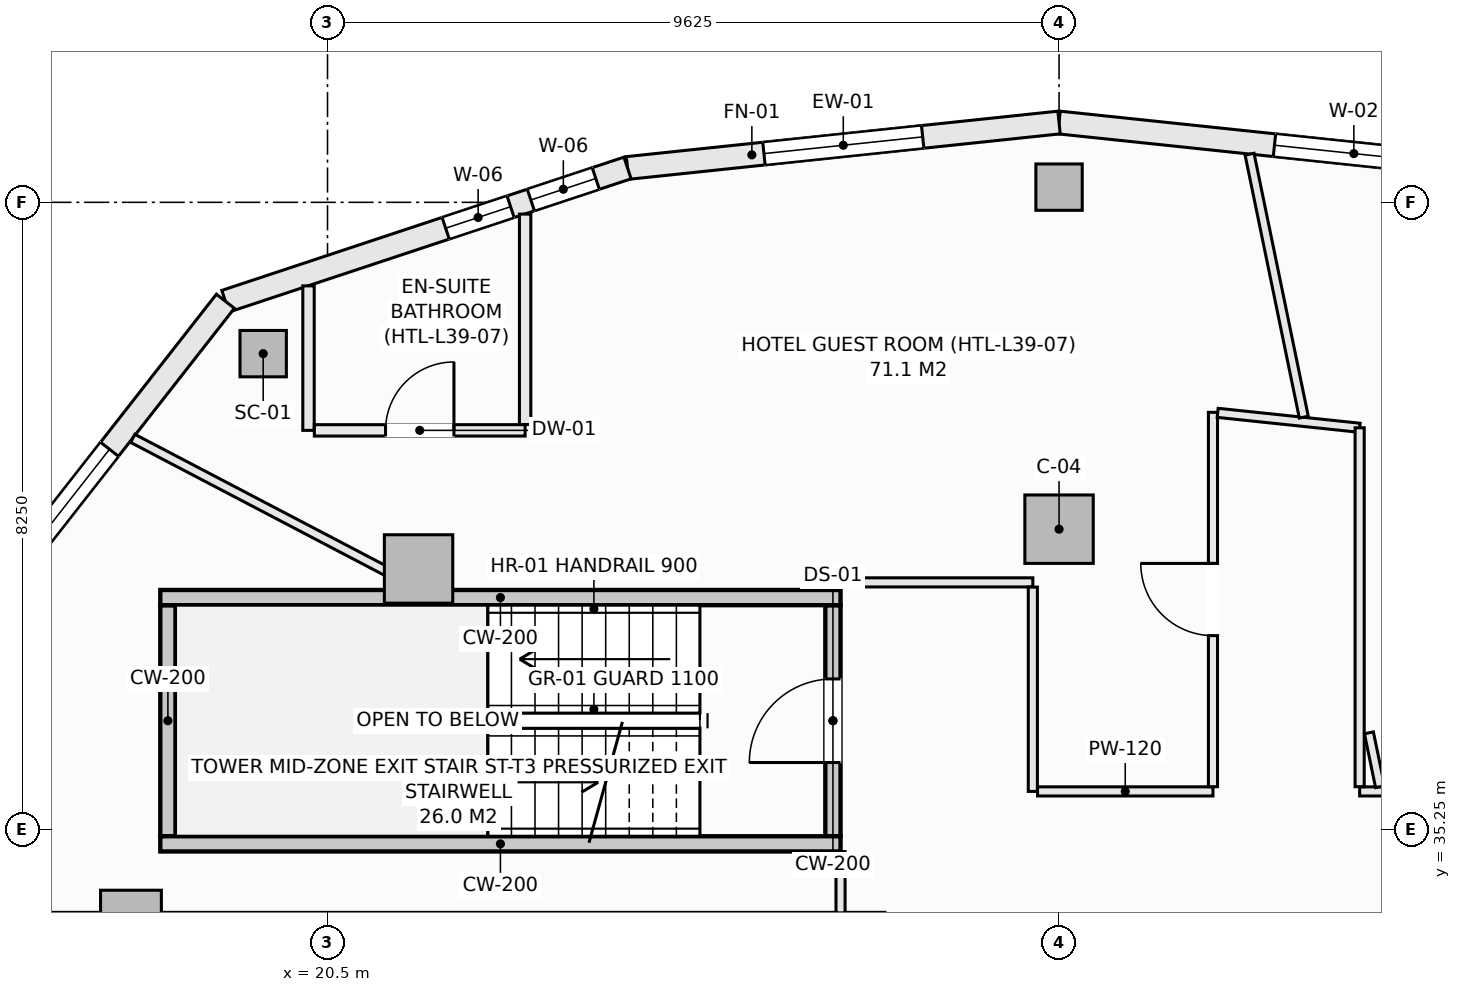
"""IFC4 building model, lengths in metres.
Left out: names, types, materials, properties, quantities, classifications, styles, units other than length and angle.
Written with IfcOpenShell. Run it as: python <this file> out.ifc"""

import sys

from ifc_helpers import new_model, si_unit, direction, frame, frame_2d, origin, origin_2d, place, context, subcontext, project, spatial, rectangle, hollow_rectangle, extrude, element, fill, save


model = new_model("IFC4")
c1 = context("Model", 3, precision=1e-05, world=origin(), true_north=direction((0.0, 1.0)))
c2 = subcontext(c1, "Body", "Model", "MODEL_VIEW")
j1 = project(units=[si_unit("LENGTHUNIT", "METRE"), si_unit("PLANEANGLEUNIT", "RADIAN")], contexts=[c1])
p1 = place(None, origin())
s1 = spatial("IfcSite", under=j1, at=p1, CompositionType="ELEMENT")
p2 = place(p1, origin())
s2 = spatial("IfcBuilding", under=s1, at=p2, CompositionType="ELEMENT")
p3 = place(p2, frame((0.0, 0.0, 152.9)))
s3 = spatial("IfcBuildingStorey", under=s2, at=p3, CompositionType="ELEMENT", Elevation=152.9)
for number, where, z_axis, x_axis in (
    (1, (30.125, 43.7, -0.27), (0.0, 0.0, 1.0), (1.0, 0.0, 0.0)),
    (2, (19.654, 41.51, -0.27), (0.0, 0.0, 1.0), (1.0, 0.0, 0.0)),
):
    element("IfcColumn", number, at=place(p3, frame(where, z_axis=z_axis, x_axis=x_axis)), inside=s3, PredefinedType="COLUMN", context=c2, shape_type="SweptSolid", body=[
        extrude(hollow_rectangle(XDim=0.61, YDim=0.61, WallThickness=0.025, at=origin_2d()), origin(), (0.0, 0.0, 1.0), 3.4),
    ])
for number, where, z_axis, x_axis in (
    (3, (30.125, 39.2, -0.27), (0.0, 0.0, 1.0), (1.0, 0.0, 0.0)),
    (4, (21.698, 38.677, -0.27), (0.0, 0.0, 1.0), (1.0, 0.0, 0.0)),
):
    element("IfcColumn", number, at=place(p3, frame(where, z_axis=z_axis, x_axis=x_axis)), inside=s3, PredefinedType="COLUMN", context=c2, shape_type="SweptSolid", body=[
        extrude(rectangle(XDim=0.9, YDim=0.9, at=origin_2d()), origin(), (0.0, 0.0, 1.0), 3.4),
    ])
p4 = place(p3, frame((17.914, 34.05, -0.27), z_axis=(0.0, 0.0, 1.0), x_axis=(1.0, 0.0, 0.0)))
e5 = element("IfcColumn", 5, at=p4, inside=s3, PredefinedType="PILASTER", context=c2, shape_type="SweptSolid", body=[
    extrude(rectangle(XDim=0.8, YDim=0.8, at=origin_2d()), origin(), (0.0, 0.0, 1.0), 3.4),
])
p5 = place(p3, frame((30.125, 44.55, 0.0), z_axis=(0.0, 0.0, 1.0), x_axis=(0.994496545245, -0.104769372887, 0.0)))
e6 = element("IfcWall", 6, at=p5, inside=s3, PredefinedType="SOLIDWALL", context=c2, shape_type="SweptSolid", body=[
    extrude(rectangle(XDim=5.709, YDim=0.3, at=frame_2d((2.854, 0.0))), origin(), (0.0, 0.0, 1.0), 2.653),
])
p6 = place(p5, frame((2.85, 0.0, 0.74)))
e7 = element("IfcOpeningElement", 7, at=p6, cuts=e6, PredefinedType="OPENING", context=c2, shape_type="SweptSolid", body=[
    extrude(rectangle(XDim=2.1, YDim=1.7, at=frame_2d((1.05, 0.85))), frame((0.0, 0.16, 0.0), z_axis=(0.0, -1.0, 0.0), x_axis=(1.0, 0.0, 0.0)), (0.0, 0.0, 1.0), 0.32),
])
p7 = place(p3, frame((24.447, 43.952, 0.0), z_axis=(0.0, 0.0, 1.0), x_axis=(0.994496545245, 0.104769372887, 0.0)))
e8 = element("IfcWall", 8, at=p7, inside=s3, PredefinedType="SOLIDWALL", context=c2, shape_type="SweptSolid", body=[
    extrude(rectangle(XDim=5.709, YDim=0.3, at=frame_2d((2.854, 0.0))), origin(), (0.0, 0.0, 1.0), 2.653),
])
p8 = place(p7, frame((1.805, 0.0, 0.74)))
e9 = element("IfcOpeningElement", 9, at=p8, cuts=e8, PredefinedType="OPENING", context=c2, shape_type="SweptSolid", body=[
    extrude(rectangle(XDim=2.1, YDim=1.7, at=frame_2d((1.05, 0.85))), frame((0.0, 0.16, 0.0), z_axis=(0.0, -1.0, 0.0), x_axis=(1.0, 0.0, 0.0)), (0.0, 0.0, 1.0), 0.32),
])
p9 = place(p3, frame((19.156, 42.199, 0.0), z_axis=(0.0, 0.0, 1.0), x_axis=(0.949246811547, 0.314532177636, 0.0)))
e10 = element("IfcWall", 10, at=p9, inside=s3, PredefinedType="SOLIDWALL", context=c2, shape_type="SweptSolid", body=[
    extrude(rectangle(XDim=5.574, YDim=0.3, at=frame_2d((2.787, 0.0))), origin(), (0.0, 0.0, 1.0), 2.653),
])
p10 = place(p9, frame((3.053, 0.0, 0.74)))
e11 = element("IfcOpeningElement", 11, at=p10, cuts=e10, PredefinedType="OPENING", context=c2, shape_type="SweptSolid", body=[
    extrude(rectangle(XDim=0.9, YDim=1.7, at=frame_2d((0.45, 0.85))), frame((0.0, 0.16, 0.0), z_axis=(0.0, -1.0, 0.0), x_axis=(1.0, 0.0, 0.0)), (0.0, 0.0, 1.0), 0.32),
])
p11 = place(p9, frame((4.234, 0.0, 0.74)))
e12 = element("IfcOpeningElement", 12, at=p11, cuts=e10, PredefinedType="OPENING", context=c2, shape_type="SweptSolid", body=[
    extrude(rectangle(XDim=0.9, YDim=1.7, at=frame_2d((0.45, 0.85))), frame((0.0, 0.16, 0.0), z_axis=(0.0, -1.0, 0.0), x_axis=(1.0, 0.0, 0.0)), (0.0, 0.0, 1.0), 0.32),
])
p12 = place(p3, frame((15.937, 38.086, 0.0), z_axis=(0.0, 0.0, 1.0), x_axis=(0.616429245738, 0.787410302828, 0.0)))
e13 = element("IfcWall", 13, at=p12, inside=s3, PredefinedType="SOLIDWALL", context=c2, shape_type="SweptSolid", body=[
    extrude(rectangle(XDim=5.223, YDim=0.3, at=frame_2d((2.612, 0.0))), origin(), (0.0, 0.0, 1.0), 2.653),
])
p13 = place(p12, frame((0.65, 0.0, 0.74)))
e14 = element("IfcOpeningElement", 14, at=p13, cuts=e13, PredefinedType="OPENING", context=c2, shape_type="SweptSolid", body=[
    extrude(rectangle(XDim=2.1, YDim=1.7, at=frame_2d((1.05, 0.85))), frame((0.0, 0.16, 0.0), z_axis=(0.0, -1.0, 0.0), x_axis=(1.0, 0.0, 0.0)), (0.0, 0.0, 1.0), 0.32),
])
p14 = place(p3, frame((27.15, 35.16, -0.27), z_axis=(0.0, 0.0, 1.0), x_axis=(0.0, 1.0, 0.0)))
e15 = element("IfcWall", 15, at=p14, inside=s3, PredefinedType="SHEAR", context=c2, shape_type="SweptSolid", body=[
    extrude(rectangle(XDim=3.04, YDim=0.2, at=frame_2d((1.52, 0.0))), origin(), (0.0, 0.0, 1.0), 3.4),
])
p15 = place(p14, frame((0.97, 0.0, 0.27)))
e16 = element("IfcOpeningElement", 16, at=p15, cuts=e15, PredefinedType="OPENING", context=c2, shape_type="SweptSolid", body=[
    extrude(rectangle(XDim=1.1, YDim=2.15, at=frame_2d((0.55, 1.075))), frame((0.0, 0.11, 0.0), z_axis=(0.0, -1.0, 0.0), x_axis=(1.0, 0.0, 0.0)), (0.0, 0.0, 1.0), 0.22),
])
p16 = place(p3, frame((18.4, 35.16, -0.27), z_axis=(0.0, 0.0, 1.0), x_axis=(0.0, 1.0, 0.0)))
e17 = element("IfcWall", 17, at=p16, inside=s3, PredefinedType="SHEAR", context=c2, shape_type="SweptSolid", body=[
    extrude(rectangle(XDim=3.04, YDim=0.2, at=frame_2d((1.52, 0.0))), origin(), (0.0, 0.0, 1.0), 3.4),
])
for number, where, z_axis, x_axis in (
    (18, (18.3, 38.3, -0.27), (0.0, 0.0, 1.0), (1.0, 0.0, 0.0)),
    (19, (18.3, 35.06, -0.27), (0.0, 0.0, 1.0), (1.0, 0.0, 0.0)),
):
    element("IfcWall", number, at=place(p3, frame(where, z_axis=z_axis, x_axis=x_axis)), inside=s3, PredefinedType="SHEAR", context=c2, shape_type="SweptSolid", body=[
        extrude(rectangle(XDim=8.95, YDim=0.2, at=frame_2d((4.475, 0.0))), origin(), (0.0, 0.0, 1.0), 3.4),
    ])
p17 = place(p3, frame((27.25, 34.152, 0.0), z_axis=(0.0, 0.0, 1.0), x_axis=(0.0, 1.0, 0.0)))
e20 = element("IfcWall", 20, at=p17, inside=s3, PredefinedType="PARTITIONING", context=c2, shape_type="SweptSolid", body=[
    extrude(rectangle(XDim=0.806, YDim=0.12, at=frame_2d((0.403, 0.0))), origin(), (0.0, 0.0, 1.0), 3.13),
])
p18 = place(p3, frame((27.25, 38.5, 0.0), z_axis=(0.0, 0.0, 1.0), x_axis=(1.0, 0.0, 0.0)))
e21 = element("IfcWall", 21, at=p18, inside=s3, PredefinedType="PARTITIONING", context=c2, shape_type="SweptSolid", body=[
    extrude(rectangle(XDim=2.53, YDim=0.12, at=frame_2d((1.265, 0.0))), origin(), (0.0, 0.0, 1.0), 3.13),
])
p19 = place(p3, frame((29.78, 35.75, 0.0), z_axis=(0.0, 0.0, 1.0), x_axis=(0.0, 1.0, 0.0)))
e22 = element("IfcWall", 22, at=p19, inside=s3, PredefinedType="PARTITIONING", context=c2, shape_type="SweptSolid", body=[
    extrude(rectangle(XDim=2.688, YDim=0.12, at=frame_2d((1.344, 0.0))), origin(), (0.0, 0.0, 1.0), 3.13),
])
p20 = place(p3, frame((29.842, 35.75, 0.0), z_axis=(0.0, 0.0, 1.0), x_axis=(1.0, 0.0, 0.0)))
e23 = element("IfcWall", 23, at=p20, inside=s3, PredefinedType="PARTITIONING", context=c2, shape_type="SweptSolid", body=[
    extrude(rectangle(XDim=2.308, YDim=0.12, at=frame_2d((1.154, 0.0))), origin(), (0.0, 0.0, 1.0), 3.13),
])
p21 = place(p3, frame((34.08, 35.75, 0.0), z_axis=(0.0, 0.0, 1.0), x_axis=(1.0, 0.0, 0.0)))
e24 = element("IfcWall", 24, at=p21, inside=s3, PredefinedType="PARTITIONING", context=c2, shape_type="SweptSolid", body=[
    extrude(rectangle(XDim=4.878, YDim=0.12, at=frame_2d((2.439, 0.0))), origin(), (0.0, 0.0, 1.0), 2.505),
])
p22 = place(p21, frame((1.544, 0.0, 0.0)))
e25 = element("IfcOpeningElement", 25, at=p22, cuts=e24, PredefinedType="OPENING", context=c2, shape_type="SweptSolid", body=[
    extrude(rectangle(XDim=0.95, YDim=2.1, at=frame_2d((0.475, 1.05))), frame((0.0, 0.07, 0.0), z_axis=(0.0, -1.0, 0.0), x_axis=(1.0, 0.0, 0.0)), (0.0, 0.0, 1.0), 0.14),
])
p23 = place(p3, frame((32.15, 35.812, 0.0), z_axis=(0.0, 0.0, 1.0), x_axis=(0.0, 1.0, 0.0)))
e26 = element("IfcWall", 26, at=p23, inside=s3, PredefinedType="PARTITIONING", context=c2, shape_type="SweptSolid", body=[
    extrude(rectangle(XDim=4.925, YDim=0.12, at=frame_2d((2.462, 0.0))), origin(), (0.0, 0.0, 1.0), 3.13),
])
p24 = place(p23, frame((1.988, 0.0, 0.0)))
e27 = element("IfcOpeningElement", 27, at=p24, cuts=e26, PredefinedType="OPENING", context=c2, shape_type="SweptSolid", body=[
    extrude(rectangle(XDim=0.95, YDim=2.1, at=frame_2d((0.475, 1.05))), frame((0.0, 0.07, 0.0), z_axis=(0.0, -1.0, 0.0), x_axis=(1.0, 0.0, 0.0)), (0.0, 0.0, 1.0), 0.14),
])
p25 = place(p3, frame((32.212, 40.73, 0.0), z_axis=(0.0, 0.0, 1.0), x_axis=(0.994511860417, -0.104623895405, 0.0)))
e28 = element("IfcWall", 28, at=p25, inside=s3, PredefinedType="PARTITIONING", context=c2, shape_type="SweptSolid", body=[
    extrude(rectangle(XDim=1.878, YDim=0.12, at=frame_2d((0.939, 0.0))), origin(), (0.0, 0.0, 1.0), 3.13),
])
p26 = place(p3, frame((34.08, 35.812, 0.0), z_axis=(0.0, 0.0, 1.0), x_axis=(0.0, 1.0, 0.0)))
e29 = element("IfcWall", 29, at=p26, inside=s3, PredefinedType="PARTITIONING", context=c2, shape_type="SweptSolid", body=[
    extrude(rectangle(XDim=4.722, YDim=0.12, at=frame_2d((2.361, 0.0))), origin(), (0.0, 0.0, 1.0), 2.812),
])
p27 = place(p3, frame((17.937, 40.395, 0.0), z_axis=(0.0, 0.0, 1.0), x_axis=(0.885906043835, -0.463864723273, 0.0)))
e30 = element("IfcWall", 30, at=p27, inside=s3, PredefinedType="PARTITIONING", context=c2, shape_type="SweptSolid", body=[
    extrude(rectangle(XDim=4.296, YDim=0.12, at=frame_2d((2.148, 0.0))), origin(), (0.0, 0.0, 1.0), 3.13),
])
p28 = place(p3, frame((32.631, 44.133, 0.0), z_axis=(0.0, 0.0, 1.0), x_axis=(0.202079954577, -0.979369027465, 0.0)))
e31 = element("IfcWall", 31, at=p28, inside=s3, PredefinedType="PARTITIONING", context=c2, shape_type="SweptSolid", body=[
    extrude(rectangle(XDim=3.533, YDim=0.12, at=frame_2d((1.766, 0.0))), origin(), (0.0, 0.0, 1.0), 3.13),
])
p29 = place(p3, frame((34.202, 36.521, 0.0), z_axis=(0.0, 0.0, 1.0), x_axis=(0.202081256143, -0.979368758903, 0.0)))
e32 = element("IfcWall", 32, at=p29, inside=s3, PredefinedType="PARTITIONING", context=c2, shape_type="SweptSolid", body=[
    extrude(rectangle(XDim=0.724, YDim=0.12, at=frame_2d((0.362, 0.0))), origin(), (0.0, 0.0, 1.0), 3.13),
])
p30 = place(p3, frame((20.25, 40.5, 0.0), z_axis=(0.0, 0.0, 1.0), x_axis=(0.0, 1.0, 0.0)))
e33 = element("IfcWall", 33, at=p30, inside=s3, PredefinedType="PARTITIONING", context=c2, shape_type="SweptSolid", body=[
    extrude(rectangle(XDim=1.901, YDim=0.15, at=frame_2d((0.95, 0.0))), origin(), (0.0, 0.0, 1.0), 2.505),
])
p31 = place(p3, frame((20.327, 40.5, 0.0), z_axis=(0.0, 0.0, 1.0), x_axis=(1.0, 0.0, 0.0)))
e34 = element("IfcWall", 34, at=p31, inside=s3, PredefinedType="PARTITIONING", context=c2, shape_type="SweptSolid", body=[
    extrude(rectangle(XDim=2.773, YDim=0.15, at=frame_2d((1.387, 0.0))), origin(), (0.0, 0.0, 1.0), 3.13),
])
p32 = place(p31, frame((0.937, 0.0, 0.0)))
e35 = element("IfcOpeningElement", 35, at=p32, cuts=e34, PredefinedType="OPENING", context=c2, shape_type="SweptSolid", body=[
    extrude(rectangle(XDim=0.9, YDim=2.1, at=frame_2d((0.45, 1.05))), frame((0.0, 0.085, 0.0), z_axis=(0.0, -1.0, 0.0), x_axis=(1.0, 0.0, 0.0)), (0.0, 0.0, 1.0), 0.17),
])
p33 = place(p3, frame((23.1, 40.577, 0.0), z_axis=(0.0, 0.0, 1.0), x_axis=(0.0, 1.0, 0.0)))
e36 = element("IfcWall", 36, at=p33, inside=s3, PredefinedType="PARTITIONING", context=c2, shape_type="SweptSolid", body=[
    extrude(rectangle(XDim=2.769, YDim=0.15, at=frame_2d((1.384, 0.0))), origin(), (0.0, 0.0, 1.0), 3.13),
])
p34 = place(p6, origin())
e37 = element("IfcWindow", 37, at=p34, inside=s3, PartitioningType="SINGLE_PANEL", PredefinedType="WINDOW", context=c2, shape_type="SweptSolid", body=[
    extrude(rectangle(XDim=2.1, YDim=1.7, at=frame_2d((1.05, 0.85))), frame((0.0, 0.03, 0.0), z_axis=(0.0, -1.0, 0.0), x_axis=(1.0, 0.0, 0.0)), (0.0, 0.0, 1.0), 0.06),
])
fill(e7, e37)
p35 = place(p8, origin())
e38 = element("IfcWindow", 38, at=p35, inside=s3, PartitioningType="SINGLE_PANEL", PredefinedType="WINDOW", context=c2, shape_type="SweptSolid", body=[
    extrude(rectangle(XDim=2.1, YDim=1.7, at=frame_2d((1.05, 0.85))), frame((0.0, 0.03, 0.0), z_axis=(0.0, -1.0, 0.0), x_axis=(1.0, 0.0, 0.0)), (0.0, 0.0, 1.0), 0.06),
])
fill(e9, e38)
p36 = place(p10, origin())
e39 = element("IfcWindow", 39, at=p36, inside=s3, PartitioningType="SINGLE_PANEL", PredefinedType="WINDOW", context=c2, shape_type="SweptSolid", body=[
    extrude(rectangle(XDim=0.9, YDim=1.7, at=frame_2d((0.45, 0.85))), frame((0.0, 0.03, 0.0), z_axis=(0.0, -1.0, 0.0), x_axis=(1.0, 0.0, 0.0)), (0.0, 0.0, 1.0), 0.06),
])
fill(e11, e39)
p37 = place(p13, origin())
e40 = element("IfcWindow", 40, at=p37, inside=s3, PartitioningType="SINGLE_PANEL", PredefinedType="WINDOW", context=c2, shape_type="SweptSolid", body=[
    extrude(rectangle(XDim=2.1, YDim=1.7, at=frame_2d((1.05, 0.85))), frame((0.0, 0.03, 0.0), z_axis=(0.0, -1.0, 0.0), x_axis=(1.0, 0.0, 0.0)), (0.0, 0.0, 1.0), 0.06),
])
fill(e14, e40)
p38 = place(p15, origin())
e41 = element("IfcDoor", 41, at=p38, inside=s3, OperationType="SINGLE_SWING_LEFT", PredefinedType="DOOR", context=c2, shape_type="SweptSolid", body=[
    extrude(rectangle(XDim=1.1, YDim=2.15, at=frame_2d((0.55, 1.075))), frame((0.0, 0.025, 0.0), z_axis=(0.0, -1.0, 0.0), x_axis=(1.0, 0.0, 0.0)), (0.0, 0.0, 1.0), 0.05),
])
fill(e16, e41)
p39 = place(p24, origin())
e42 = element("IfcDoor", 42, at=p39, inside=s3, OperationType="SINGLE_SWING_RIGHT", PredefinedType="DOOR", context=c2, shape_type="SweptSolid", body=[
    extrude(rectangle(XDim=0.95, YDim=2.1, at=frame_2d((0.475, 1.05))), frame((0.0, 0.025, 0.0), z_axis=(0.0, -1.0, 0.0), x_axis=(1.0, 0.0, 0.0)), (0.0, 0.0, 1.0), 0.05),
])
fill(e27, e42)
p40 = place(p32, origin())
e43 = element("IfcDoor", 43, at=p40, inside=s3, OperationType="SINGLE_SWING_RIGHT", PredefinedType="DOOR", context=c2, shape_type="SweptSolid", body=[
    extrude(rectangle(XDim=0.9, YDim=2.1, at=frame_2d((0.45, 1.05))), frame((0.0, 0.025, 0.0), z_axis=(0.0, -1.0, 0.0), x_axis=(1.0, 0.0, 0.0)), (0.0, 0.0, 1.0), 0.05),
])
fill(e35, e43)
p41 = place(p11, origin())
e44 = element("IfcWindow", 44, at=p41, inside=s3, PartitioningType="SINGLE_PANEL", PredefinedType="WINDOW", context=c2, shape_type="SweptSolid", body=[
    extrude(rectangle(XDim=0.9, YDim=1.7, at=frame_2d((0.45, 0.85))), frame((0.0, 0.03, 0.0), z_axis=(0.0, -1.0, 0.0), x_axis=(1.0, 0.0, 0.0)), (0.0, 0.0, 1.0), 0.06),
])
fill(e12, e44)
save(model, sys.argv[1])
